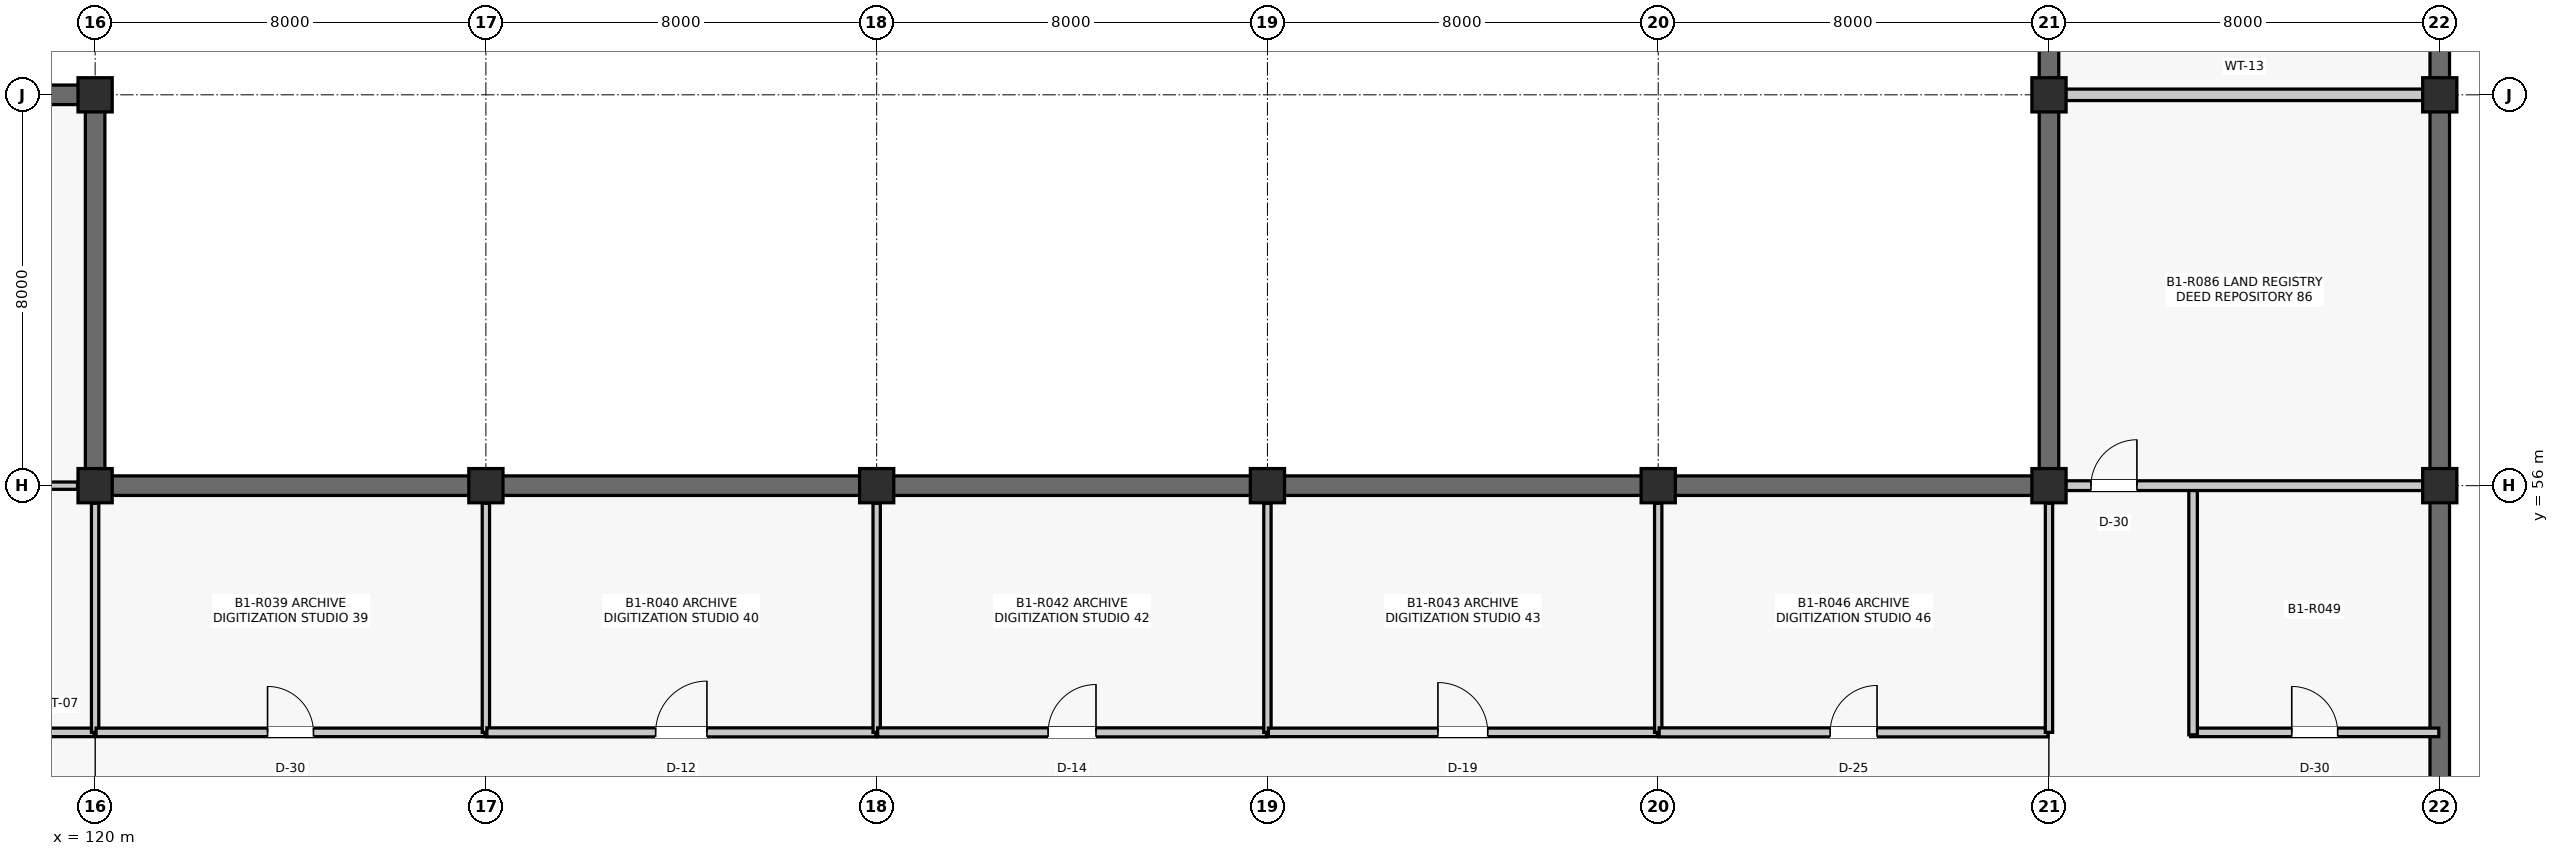
"""IFC4 building model, lengths in metres.
Left out: names, types, materials, properties, quantities, classifications, styles, units other than length and angle.
Written with IfcOpenShell. Run it as: python <this file> out.ifc"""

import sys

from ifc_helpers import new_model, si_unit, direction, frame, frame_2d, origin, origin_2d, place, context, subcontext, project, spatial, rectangle, extrude, element, fill, save


model = new_model("IFC4")
c1 = context("Model", 3, precision=1e-05, world=origin(), true_north=direction((0.0, 1.0)))
c2 = subcontext(c1, "Body", "Model", "MODEL_VIEW")
j1 = project(units=[si_unit("LENGTHUNIT", "METRE"), si_unit("PLANEANGLEUNIT", "RADIAN")], contexts=[c1])
p1 = place(None, origin())
s1 = spatial("IfcSite", under=j1, at=p1, CompositionType="ELEMENT")
p2 = place(p1, origin())
s2 = spatial("IfcBuilding", under=s1, at=p2, CompositionType="ELEMENT")
p3 = place(p2, frame((0.0, 0.0, -4.29)))
s3 = spatial("IfcBuildingStorey", under=s2, at=p3, CompositionType="ELEMENT", Elevation=-4.29)
for number, where, z_axis, x_axis in (
    (1, (120.0, 56.0, 0.0), (0.0, 0.0, 1.0), (1.0, 0.0, 0.0)),
    (2, (120.0, 64.0, 0.0), (0.0, 0.0, 1.0), (1.0, 0.0, 0.0)),
    (3, (128.0, 56.0, 0.0), (0.0, 0.0, 1.0), (1.0, 0.0, 0.0)),
    (4, (136.0, 56.0, 0.0), (0.0, 0.0, 1.0), (1.0, 0.0, 0.0)),
    (5, (144.0, 56.0, 0.0), (0.0, 0.0, 1.0), (1.0, 0.0, 0.0)),
    (6, (152.0, 56.0, 0.0), (0.0, 0.0, 1.0), (1.0, 0.0, 0.0)),
    (7, (160.0, 56.0, 0.0), (0.0, 0.0, 1.0), (1.0, 0.0, 0.0)),
    (8, (160.0, 64.0, 0.0), (0.0, 0.0, 1.0), (1.0, 0.0, 0.0)),
    (9, (168.0, 56.0, 0.0), (0.0, 0.0, 1.0), (1.0, 0.0, 0.0)),
    (10, (168.0, 64.0, 0.0), (0.0, 0.0, 1.0), (1.0, 0.0, 0.0)),
):
    element("IfcColumn", number, at=place(p3, frame(where, z_axis=z_axis, x_axis=x_axis)), inside=s3, PredefinedType="COLUMN", context=c2, shape_type="SweptSolid", body=[
        extrude(rectangle(XDim=0.7, YDim=0.7, at=origin_2d()), origin(), (0.0, 0.0, 1.0), 4.29),
    ])
p4 = place(p3, frame((112.335, 64.0, 0.0), z_axis=(0.0, 0.0, 1.0), x_axis=(1.0, 0.0, 0.0)))
e11 = element("IfcWall", 11, at=p4, inside=s3, PredefinedType="SHEAR", context=c2, shape_type="SweptSolid", body=[
    extrude(rectangle(XDim=7.33, YDim=0.4, at=frame_2d((3.665, 0.0))), origin(), (0.0, 0.0, 1.0), 3.333),
])
for number, where, z_axis, x_axis in (
    (12, (120.0, 56.335, 0.0), (0.0, 0.0, 1.0), (0.0, 1.0, 0.0)),
    (13, (120.335, 56.0, 0.0), (0.0, 0.0, 1.0), (1.0, 0.0, 0.0)),
):
    element("IfcWall", number, at=place(p3, frame(where, z_axis=z_axis, x_axis=x_axis)), inside=s3, PredefinedType="SHEAR", context=c2, shape_type="SweptSolid", body=[
        extrude(rectangle(XDim=7.33, YDim=0.4, at=frame_2d((3.665, 0.0))), origin(), (0.0, 0.0, 1.0), 3.664),
    ])
p5 = place(p3, frame((128.335, 56.0, 0.0), z_axis=(0.0, 0.0, 1.0), x_axis=(1.0, 0.0, 0.0)))
e14 = element("IfcWall", 14, at=p5, inside=s3, PredefinedType="SHEAR", context=c2, shape_type="SweptSolid", body=[
    extrude(rectangle(XDim=7.33, YDim=0.4, at=frame_2d((3.665, 0.0))), origin(), (0.0, 0.0, 1.0), 3.604),
])
p6 = place(p3, frame((136.335, 56.0, 0.0), z_axis=(0.0, 0.0, 1.0), x_axis=(1.0, 0.0, 0.0)))
e15 = element("IfcWall", 15, at=p6, inside=s3, PredefinedType="SHEAR", context=c2, shape_type="SweptSolid", body=[
    extrude(rectangle(XDim=7.33, YDim=0.4, at=frame_2d((3.665, 0.0))), origin(), (0.0, 0.0, 1.0), 3.667),
])
p7 = place(p3, frame((144.335, 56.0, 0.0), z_axis=(0.0, 0.0, 1.0), x_axis=(1.0, 0.0, 0.0)))
e16 = element("IfcWall", 16, at=p7, inside=s3, PredefinedType="SHEAR", context=c2, shape_type="SweptSolid", body=[
    extrude(rectangle(XDim=7.33, YDim=0.4, at=frame_2d((3.665, 0.0))), origin(), (0.0, 0.0, 1.0), 3.6),
])
p8 = place(p3, frame((152.335, 56.0, 0.0), z_axis=(0.0, 0.0, 1.0), x_axis=(1.0, 0.0, 0.0)))
e17 = element("IfcWall", 17, at=p8, inside=s3, PredefinedType="SHEAR", context=c2, shape_type="SweptSolid", body=[
    extrude(rectangle(XDim=7.33, YDim=0.4, at=frame_2d((3.665, 0.0))), origin(), (0.0, 0.0, 1.0), 3.664),
])
p9 = place(p3, frame((168.0, 48.335, 0.0), z_axis=(0.0, 0.0, 1.0), x_axis=(0.0, 1.0, 0.0)))
e18 = element("IfcWall", 18, at=p9, inside=s3, PredefinedType="SHEAR", context=c2, shape_type="SweptSolid", body=[
    extrude(rectangle(XDim=7.33, YDim=0.4, at=frame_2d((3.665, 0.0))), origin(), (0.0, 0.0, 1.0), 3.468),
])
p10 = place(p3, frame((160.0, 56.335, 0.0), z_axis=(0.0, 0.0, 1.0), x_axis=(0.0, 1.0, 0.0)))
e19 = element("IfcWall", 19, at=p10, inside=s3, PredefinedType="SHEAR", context=c2, shape_type="SweptSolid", body=[
    extrude(rectangle(XDim=7.33, YDim=0.4, at=frame_2d((3.665, 0.0))), origin(), (0.0, 0.0, 1.0), 3.604),
])
p11 = place(p3, frame((168.0, 56.335, 0.0), z_axis=(0.0, 0.0, 1.0), x_axis=(0.0, 1.0, 0.0)))
e20 = element("IfcWall", 20, at=p11, inside=s3, PredefinedType="SHEAR", context=c2, shape_type="SweptSolid", body=[
    extrude(rectangle(XDim=7.33, YDim=0.4, at=frame_2d((3.665, 0.0))), origin(), (0.0, 0.0, 1.0), 3.4),
])
p12 = place(p3, frame((160.0, 64.335, 0.0), z_axis=(0.0, 0.0, 1.0), x_axis=(0.0, 1.0, 0.0)))
e21 = element("IfcWall", 21, at=p12, inside=s3, PredefinedType="SHEAR", context=c2, shape_type="SweptSolid", body=[
    extrude(rectangle(XDim=7.33, YDim=0.4, at=frame_2d((3.665, 0.0))), origin(), (0.0, 0.0, 1.0), 3.667),
])
p13 = place(p3, frame((168.0, 64.335, 0.0), z_axis=(0.0, 0.0, 1.0), x_axis=(0.0, 1.0, 0.0)))
e22 = element("IfcWall", 22, at=p13, inside=s3, PredefinedType="SHEAR", context=c2, shape_type="SweptSolid", body=[
    extrude(rectangle(XDim=7.33, YDim=0.4, at=frame_2d((3.665, 0.0))), origin(), (0.0, 0.0, 1.0), 3.409),
])
p14 = place(p3, frame((114.9, 50.95, 0.0), z_axis=(0.0, 0.0, 1.0), x_axis=(1.0, 0.0, 0.0)))
e23 = element("IfcWall", 23, at=p14, inside=s3, PredefinedType="PARTITIONING", context=c2, shape_type="SweptSolid", body=[
    extrude(rectangle(XDim=5.08, YDim=0.175, at=frame_2d((2.54, 0.0))), origin(), (0.0, 0.0, 1.0), 3.402),
])
p15 = place(p14, frame((1.98, 0.0, 0.0)))
e24 = element("IfcOpeningElement", 24, at=p15, cuts=e23, PredefinedType="OPENING", context=c2, shape_type="SweptSolid", body=[
    extrude(rectangle(XDim=1.12, YDim=2.22, at=frame_2d((0.56, 1.11))), frame((0.0, 0.097, 0.0), z_axis=(0.0, -1.0, 0.0), x_axis=(1.0, 0.0, 0.0)), (0.0, 0.0, 1.0), 0.195),
])
p16 = place(p3, frame((114.95, 56.0, 0.0), z_axis=(0.0, 0.0, 1.0), x_axis=(1.0, 0.0, 0.0)))
e25 = element("IfcWall", 25, at=p16, inside=s3, PredefinedType="PARTITIONING", context=c2, shape_type="SweptSolid", body=[
    extrude(rectangle(XDim=4.69, YDim=0.15, at=frame_2d((2.345, 0.0))), origin(), (0.0, 0.0, 1.0), 3.393),
])
p17 = place(p3, frame((120.0, 50.95, 0.0), z_axis=(0.0, 0.0, 1.0), x_axis=(0.0, 1.0, 0.0)))
e26 = element("IfcWall", 26, at=p17, inside=s3, PredefinedType="PARTITIONING", context=c2, shape_type="SweptSolid", body=[
    extrude(rectangle(XDim=4.69, YDim=0.15, at=frame_2d((2.345, 0.0))), origin(), (0.0, 0.0, 1.0), 3.402),
])
p18 = place(p3, frame((120.02, 50.95, 0.0), z_axis=(0.0, 0.0, 1.0), x_axis=(1.0, 0.0, 0.0)))
e27 = element("IfcWall", 27, at=p18, inside=s3, PredefinedType="PARTITIONING", context=c2, shape_type="SweptSolid", body=[
    extrude(rectangle(XDim=7.96, YDim=0.175, at=frame_2d((3.98, 0.0))), origin(), (0.0, 0.0, 1.0), 3.394),
])
p19 = place(p18, frame((3.51, 0.0, 0.0)))
e28 = element("IfcOpeningElement", 28, at=p19, cuts=e27, PredefinedType="OPENING", context=c2, shape_type="SweptSolid", body=[
    extrude(rectangle(XDim=0.94, YDim=2.12, at=frame_2d((0.47, 1.06))), frame((0.0, 0.097, 0.0), z_axis=(0.0, -1.0, 0.0), x_axis=(1.0, 0.0, 0.0)), (0.0, 0.0, 1.0), 0.195),
])
p20 = place(p3, frame((128.0, 50.95, 0.0), z_axis=(0.0, 0.0, 1.0), x_axis=(0.0, 1.0, 0.0)))
e29 = element("IfcWall", 29, at=p20, inside=s3, PredefinedType="PARTITIONING", context=c2, shape_type="SweptSolid", body=[
    extrude(rectangle(XDim=4.69, YDim=0.15, at=frame_2d((2.345, 0.0))), origin(), (0.0, 0.0, 1.0), 3.394),
])
p21 = place(p3, frame((128.02, 50.95, 0.0), z_axis=(0.0, 0.0, 1.0), x_axis=(1.0, 0.0, 0.0)))
e30 = element("IfcWall", 30, at=p21, inside=s3, PredefinedType="PARTITIONING", context=c2, shape_type="SweptSolid", body=[
    extrude(rectangle(XDim=7.96, YDim=0.185, at=frame_2d((3.98, 0.0))), origin(), (0.0, 0.0, 1.0), 3.394),
])
p22 = place(p21, frame((3.455, 0.0, 0.0)))
e31 = element("IfcOpeningElement", 31, at=p22, cuts=e30, PredefinedType="OPENING", context=c2, shape_type="SweptSolid", body=[
    extrude(rectangle(XDim=1.05, YDim=2.15, at=frame_2d((0.525, 1.075))), frame((0.0, 0.103, 0.0), z_axis=(0.0, -1.0, 0.0), x_axis=(1.0, 0.0, 0.0)), (0.0, 0.0, 1.0), 0.205),
])
p23 = place(p3, frame((136.0, 50.95, 0.0), z_axis=(0.0, 0.0, 1.0), x_axis=(0.0, 1.0, 0.0)))
e32 = element("IfcWall", 32, at=p23, inside=s3, PredefinedType="PARTITIONING", context=c2, shape_type="SweptSolid", body=[
    extrude(rectangle(XDim=4.69, YDim=0.15, at=frame_2d((2.345, 0.0))), origin(), (0.0, 0.0, 1.0), 3.461),
])
p24 = place(p3, frame((136.02, 50.95, 0.0), z_axis=(0.0, 0.0, 1.0), x_axis=(1.0, 0.0, 0.0)))
e33 = element("IfcWall", 33, at=p24, inside=s3, PredefinedType="PARTITIONING", context=c2, shape_type="SweptSolid", body=[
    extrude(rectangle(XDim=7.96, YDim=0.185, at=frame_2d((3.98, 0.0))), origin(), (0.0, 0.0, 1.0), 3.393),
])
p25 = place(p24, frame((3.49, 0.0, 0.0)))
e34 = element("IfcOpeningElement", 34, at=p25, cuts=e33, PredefinedType="OPENING", context=c2, shape_type="SweptSolid", body=[
    extrude(rectangle(XDim=0.98, YDim=2.15, at=frame_2d((0.49, 1.075))), frame((0.0, 0.103, 0.0), z_axis=(0.0, -1.0, 0.0), x_axis=(1.0, 0.0, 0.0)), (0.0, 0.0, 1.0), 0.205),
])
p26 = place(p3, frame((144.0, 50.95, 0.0), z_axis=(0.0, 0.0, 1.0), x_axis=(0.0, 1.0, 0.0)))
e35 = element("IfcWall", 35, at=p26, inside=s3, PredefinedType="PARTITIONING", context=c2, shape_type="SweptSolid", body=[
    extrude(rectangle(XDim=4.69, YDim=0.15, at=frame_2d((2.345, 0.0))), origin(), (0.0, 0.0, 1.0), 3.393),
])
p27 = place(p3, frame((144.02, 50.95, 0.0), z_axis=(0.0, 0.0, 1.0), x_axis=(1.0, 0.0, 0.0)))
e36 = element("IfcWall", 36, at=p27, inside=s3, PredefinedType="PARTITIONING", context=c2, shape_type="SweptSolid", body=[
    extrude(rectangle(XDim=7.96, YDim=0.175, at=frame_2d((3.98, 0.0))), origin(), (0.0, 0.0, 1.0), 3.393),
])
p28 = place(p27, frame((3.47, 0.0, 0.0)))
e37 = element("IfcOpeningElement", 37, at=p28, cuts=e36, PredefinedType="OPENING", context=c2, shape_type="SweptSolid", body=[
    extrude(rectangle(XDim=1.02, YDim=2.2, at=frame_2d((0.51, 1.1))), frame((0.0, 0.097, 0.0), z_axis=(0.0, -1.0, 0.0), x_axis=(1.0, 0.0, 0.0)), (0.0, 0.0, 1.0), 0.195),
])
p29 = place(p3, frame((152.0, 50.95, 0.0), z_axis=(0.0, 0.0, 1.0), x_axis=(0.0, 1.0, 0.0)))
e38 = element("IfcWall", 38, at=p29, inside=s3, PredefinedType="PARTITIONING", context=c2, shape_type="SweptSolid", body=[
    extrude(rectangle(XDim=4.69, YDim=0.15, at=frame_2d((2.345, 0.0))), origin(), (0.0, 0.0, 1.0), 3.402),
])
p30 = place(p3, frame((152.02, 50.95, 0.0), z_axis=(0.0, 0.0, 1.0), x_axis=(1.0, 0.0, 0.0)))
e39 = element("IfcWall", 39, at=p30, inside=s3, PredefinedType="PARTITIONING", context=c2, shape_type="SweptSolid", body=[
    extrude(rectangle(XDim=7.96, YDim=0.185, at=frame_2d((3.98, 0.0))), origin(), (0.0, 0.0, 1.0), 3.394),
])
p31 = place(p30, frame((3.5, 0.0, 0.0)))
e40 = element("IfcOpeningElement", 40, at=p31, cuts=e39, PredefinedType="OPENING", context=c2, shape_type="SweptSolid", body=[
    extrude(rectangle(XDim=0.96, YDim=2.14, at=frame_2d((0.48, 1.07))), frame((0.0, 0.103, 0.0), z_axis=(0.0, -1.0, 0.0), x_axis=(1.0, 0.0, 0.0)), (0.0, 0.0, 1.0), 0.205),
])
p32 = place(p3, frame((160.0, 50.95, 0.0), z_axis=(0.0, 0.0, 1.0), x_axis=(0.0, 1.0, 0.0)))
e41 = element("IfcWall", 41, at=p32, inside=s3, PredefinedType="PARTITIONING", context=c2, shape_type="SweptSolid", body=[
    extrude(rectangle(XDim=4.69, YDim=0.15, at=frame_2d((2.345, 0.0))), origin(), (0.0, 0.0, 1.0), 3.394),
])
p33 = place(p3, frame((162.9, 50.95, 0.0), z_axis=(0.0, 0.0, 1.0), x_axis=(1.0, 0.0, 0.0)))
e42 = element("IfcWall", 42, at=p33, inside=s3, PredefinedType="PARTITIONING", context=c2, shape_type="SweptSolid", body=[
    extrude(rectangle(XDim=5.08, YDim=0.175, at=frame_2d((2.54, 0.0))), origin(), (0.0, 0.0, 1.0), 3.461),
])
p34 = place(p33, frame((2.07, 0.0, 0.0)))
e43 = element("IfcOpeningElement", 43, at=p34, cuts=e42, PredefinedType="OPENING", context=c2, shape_type="SweptSolid", body=[
    extrude(rectangle(XDim=0.94, YDim=2.12, at=frame_2d((0.47, 1.06))), frame((0.0, 0.097, 0.0), z_axis=(0.0, -1.0, 0.0), x_axis=(1.0, 0.0, 0.0)), (0.0, 0.0, 1.0), 0.195),
])
p35 = place(p3, frame((162.95, 50.9, 0.0), z_axis=(0.0, 0.0, 1.0), x_axis=(0.0, 1.0, 0.0)))
e44 = element("IfcWall", 44, at=p35, inside=s3, PredefinedType="PARTITIONING", context=c2, shape_type="SweptSolid", body=[
    extrude(rectangle(XDim=5.08, YDim=0.175, at=frame_2d((2.54, 0.0))), origin(), (0.0, 0.0, 1.0), 3.394),
])
p36 = place(p3, frame((160.34, 56.0, 0.0), z_axis=(0.0, 0.0, 1.0), x_axis=(1.0, 0.0, 0.0)))
e45 = element("IfcWall", 45, at=p36, inside=s3, PredefinedType="PARTITIONING", context=c2, shape_type="SweptSolid", body=[
    extrude(rectangle(XDim=7.32, YDim=0.2, at=frame_2d((3.66, 0.0))), origin(), (0.0, 0.0, 1.0), 3.394),
])
p37 = place(p36, frame((0.52, 0.0, 0.0)))
e46 = element("IfcOpeningElement", 46, at=p37, cuts=e45, PredefinedType="OPENING", context=c2, shape_type="SweptSolid", body=[
    extrude(rectangle(XDim=0.94, YDim=2.12, at=frame_2d((0.47, 1.06))), frame((0.0, 0.11, 0.0), z_axis=(0.0, -1.0, 0.0), x_axis=(1.0, 0.0, 0.0)), (0.0, 0.0, 1.0), 0.22),
])
p38 = place(p3, frame((160.34, 64.0, 0.0), z_axis=(0.0, 0.0, 1.0), x_axis=(1.0, 0.0, 0.0)))
e47 = element("IfcWall", 47, at=p38, inside=s3, PredefinedType="PARTITIONING", context=c2, shape_type="SweptSolid", body=[
    extrude(rectangle(XDim=7.32, YDim=0.235, at=frame_2d((3.66, 0.0))), origin(), (0.0, 0.0, 1.0), 3.317),
])
p39 = place(p19, origin())
e48 = element("IfcDoor", 48, at=p39, inside=s3, OperationType="SINGLE_SWING_LEFT", PredefinedType="DOOR", context=c2, shape_type="SweptSolid", body=[
    extrude(rectangle(XDim=0.94, YDim=2.12, at=frame_2d((0.47, 1.06))), frame((0.0, 0.025, 0.0), z_axis=(0.0, -1.0, 0.0), x_axis=(1.0, 0.0, 0.0)), (0.0, 0.0, 1.0), 0.05),
])
fill(e28, e48)
p40 = place(p22, origin())
e49 = element("IfcDoor", 49, at=p40, inside=s3, OperationType="SINGLE_SWING_RIGHT", PredefinedType="DOOR", context=c2, shape_type="SweptSolid", body=[
    extrude(rectangle(XDim=1.05, YDim=2.15, at=frame_2d((0.525, 1.075))), frame((0.0, 0.025, 0.0), z_axis=(0.0, -1.0, 0.0), x_axis=(1.0, 0.0, 0.0)), (0.0, 0.0, 1.0), 0.05),
])
fill(e31, e49)
p41 = place(p25, origin())
e50 = element("IfcDoor", 50, at=p41, inside=s3, OperationType="SINGLE_SWING_RIGHT", PredefinedType="DOOR", context=c2, shape_type="SweptSolid", body=[
    extrude(rectangle(XDim=0.98, YDim=2.15, at=frame_2d((0.49, 1.075))), frame((0.0, 0.025, 0.0), z_axis=(0.0, -1.0, 0.0), x_axis=(1.0, 0.0, 0.0)), (0.0, 0.0, 1.0), 0.05),
])
fill(e34, e50)
p42 = place(p28, origin())
e51 = element("IfcDoor", 51, at=p42, inside=s3, OperationType="SINGLE_SWING_LEFT", PredefinedType="DOOR", context=c2, shape_type="SweptSolid", body=[
    extrude(rectangle(XDim=1.02, YDim=2.2, at=frame_2d((0.51, 1.1))), frame((0.0, 0.025, 0.0), z_axis=(0.0, -1.0, 0.0), x_axis=(1.0, 0.0, 0.0)), (0.0, 0.0, 1.0), 0.05),
])
fill(e37, e51)
p43 = place(p31, origin())
e52 = element("IfcDoor", 52, at=p43, inside=s3, OperationType="SINGLE_SWING_RIGHT", PredefinedType="DOOR", context=c2, shape_type="SweptSolid", body=[
    extrude(rectangle(XDim=0.96, YDim=2.14, at=frame_2d((0.48, 1.07))), frame((0.0, 0.025, 0.0), z_axis=(0.0, -1.0, 0.0), x_axis=(1.0, 0.0, 0.0)), (0.0, 0.0, 1.0), 0.05),
])
fill(e40, e52)
p44 = place(p34, origin())
e53 = element("IfcDoor", 53, at=p44, inside=s3, OperationType="SINGLE_SWING_LEFT", PredefinedType="DOOR", context=c2, shape_type="SweptSolid", body=[
    extrude(rectangle(XDim=0.94, YDim=2.12, at=frame_2d((0.47, 1.06))), frame((0.0, 0.025, 0.0), z_axis=(0.0, -1.0, 0.0), x_axis=(1.0, 0.0, 0.0)), (0.0, 0.0, 1.0), 0.05),
])
fill(e43, e53)
p45 = place(p37, origin())
e54 = element("IfcDoor", 54, at=p45, inside=s3, OperationType="SINGLE_SWING_RIGHT", PredefinedType="DOOR", context=c2, shape_type="SweptSolid", body=[
    extrude(rectangle(XDim=0.94, YDim=2.12, at=frame_2d((0.47, 1.06))), frame((0.0, 0.025, 0.0), z_axis=(0.0, -1.0, 0.0), x_axis=(1.0, 0.0, 0.0)), (0.0, 0.0, 1.0), 0.05),
])
fill(e46, e54)
save(model, sys.argv[1])
